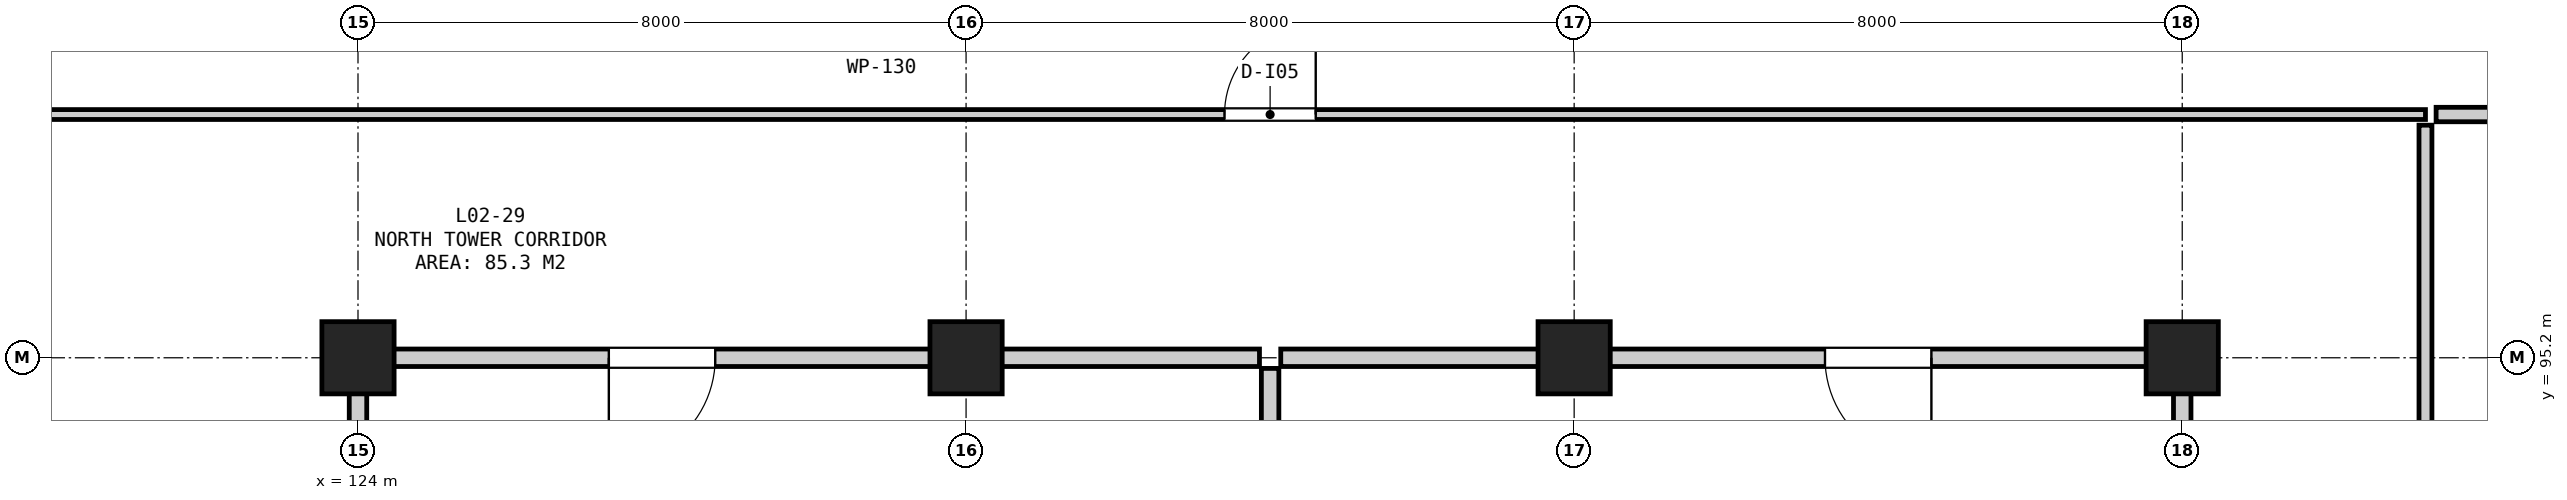
"""IFC4 building model, lengths in metres.
Left out: names, types, materials, properties, quantities, classifications, styles, units other than length and angle.
Written with IfcOpenShell. Run it as: python <this file> out.ifc"""

import sys

from ifc_helpers import new_model, si_unit, direction, frame, frame_2d, origin, origin_2d, place, context, subcontext, project, spatial, rectangle, extrude, element, fill, save


model = new_model("IFC4")
c1 = context("Model", 3, precision=1e-05, world=origin(), true_north=direction((0.0, 1.0)))
c2 = subcontext(c1, "Body", "Model", "MODEL_VIEW")
j1 = project(units=[si_unit("LENGTHUNIT", "METRE"), si_unit("PLANEANGLEUNIT", "RADIAN")], contexts=[c1])
p1 = place(None, origin())
s1 = spatial("IfcSite", under=j1, at=p1, CompositionType="ELEMENT")
p2 = place(p1, origin())
s2 = spatial("IfcBuilding", under=s1, at=p2, CompositionType="ELEMENT")
p3 = place(p2, frame((0.0, 0.0, 10.8)))
s3 = spatial("IfcBuildingStorey", under=s2, at=p3, CompositionType="ELEMENT", Elevation=10.8)
for number, where, z_axis, x_axis in (
    (1, (124.0, 95.2, 0.0), (0.0, 0.0, 1.0), (1.0, 0.0, 0.0)),
    (2, (132.0, 95.2, 0.0), (0.0, 0.0, 1.0), (1.0, 0.0, 0.0)),
    (3, (140.0, 95.2, 0.0), (0.0, 0.0, 1.0), (1.0, 0.0, 0.0)),
    (4, (148.0, 95.2, 0.0), (0.0, 0.0, 1.0), (1.0, 0.0, 0.0)),
):
    element("IfcColumn", number, at=place(p3, frame(where, z_axis=z_axis, x_axis=x_axis)), inside=s3, PredefinedType="COLUMN", context=c2, shape_type="SweptSolid", body=[
        extrude(rectangle(XDim=0.95, YDim=0.95, at=origin_2d()), origin(), (0.0, 0.0, 1.0), 4.8),
    ])
p4 = place(p3, frame((124.14, 95.2, 0.0), z_axis=(0.0, 0.0, 1.0), x_axis=(1.0, 0.0, 0.0)))
e5 = element("IfcWall", 5, at=p4, inside=s3, PredefinedType="SOLIDWALL", context=c2, shape_type="SweptSolid", body=[
    extrude(rectangle(XDim=11.72, YDim=0.23, at=frame_2d((5.86, 0.0))), origin(), (0.0, 0.0, 1.0), 3.645),
])
p5 = place(p4, frame((3.16, 0.0, 0.0)))
e6 = element("IfcOpeningElement", 6, at=p5, cuts=e5, PredefinedType="OPENING", context=c2, shape_type="SweptSolid", body=[
    extrude(rectangle(XDim=1.4, YDim=2.2, at=frame_2d((0.7, 1.1))), frame((0.0, 0.127, 0.0), z_axis=(0.0, -1.0, 0.0), x_axis=(1.0, 0.0, 0.0)), (0.0, 0.0, 1.0), 0.254),
])
p6 = place(p3, frame((124.0, 91.54, 0.0), z_axis=(0.0, 0.0, 1.0), x_axis=(0.0, 1.0, 0.0)))
e7 = element("IfcWall", 7, at=p6, inside=s3, PredefinedType="SOLIDWALL", context=c2, shape_type="SweptSolid", body=[
    extrude(rectangle(XDim=3.52, YDim=0.23, at=frame_2d((1.76, 0.0))), origin(), (0.0, 0.0, 1.0), 3.695),
])
p7 = place(p3, frame((136.0, 91.54, 0.0), z_axis=(0.0, 0.0, 1.0), x_axis=(0.0, 1.0, 0.0)))
e8 = element("IfcWall", 8, at=p7, inside=s3, PredefinedType="SOLIDWALL", context=c2, shape_type="SweptSolid", body=[
    extrude(rectangle(XDim=3.52, YDim=0.23, at=frame_2d((1.76, 0.0))), origin(), (0.0, 0.0, 1.0), 4.5),
])
p8 = place(p3, frame((136.14, 95.2, 0.0), z_axis=(0.0, 0.0, 1.0), x_axis=(1.0, 0.0, 0.0)))
e9 = element("IfcWall", 9, at=p8, inside=s3, PredefinedType="SOLIDWALL", context=c2, shape_type="SweptSolid", body=[
    extrude(rectangle(XDim=11.72, YDim=0.23, at=frame_2d((5.86, 0.0))), origin(), (0.0, 0.0, 1.0), 3.695),
])
p9 = place(p8, frame((7.16, 0.0, 0.0)))
e10 = element("IfcOpeningElement", 10, at=p9, cuts=e9, PredefinedType="OPENING", context=c2, shape_type="SweptSolid", body=[
    extrude(rectangle(XDim=1.4, YDim=2.2, at=frame_2d((0.7, 1.1))), frame((0.0, 0.127, 0.0), z_axis=(0.0, -1.0, 0.0), x_axis=(1.0, 0.0, 0.0)), (0.0, 0.0, 1.0), 0.254),
])
p10 = place(p3, frame((148.0, 91.54, 0.0), z_axis=(0.0, 0.0, 1.0), x_axis=(0.0, 1.0, 0.0)))
e11 = element("IfcWall", 11, at=p10, inside=s3, PredefinedType="SOLIDWALL", context=c2, shape_type="SweptSolid", body=[
    extrude(rectangle(XDim=3.52, YDim=0.23, at=frame_2d((1.76, 0.0))), origin(), (0.0, 0.0, 1.0), 3.795),
])
p11 = place(p3, frame((151.34, 98.4, 0.0), z_axis=(0.0, 0.0, 1.0), x_axis=(1.0, 0.0, 0.0)))
e12 = element("IfcWall", 12, at=p11, inside=s3, PredefinedType="PARTITIONING", context=c2, shape_type="SweptSolid", body=[
    extrude(rectangle(XDim=16.485, YDim=0.19, at=frame_2d((8.242, 0.0))), origin(), (0.0, 0.0, 1.0), 4.5),
])
p12 = place(p3, frame((151.2, 76.14, 0.0), z_axis=(0.0, 0.0, 1.0), x_axis=(0.0, 1.0, 0.0)))
e13 = element("IfcWall", 13, at=p12, inside=s3, PredefinedType="PARTITIONING", context=c2, shape_type="SweptSolid", body=[
    extrude(rectangle(XDim=22.12, YDim=0.17, at=frame_2d((11.06, 0.0))), origin(), (0.0, 0.0, 1.0), 4.5),
])
p13 = place(p12, frame((10.46, 0.0, 0.0)))
e14 = element("IfcOpeningElement", 14, at=p13, cuts=e13, PredefinedType="OPENING", context=c2, shape_type="SweptSolid", body=[
    extrude(rectangle(XDim=1.2, YDim=2.15, at=frame_2d((0.6, 1.075))), frame((0.0, 0.097, 0.0), z_axis=(0.0, -1.0, 0.0), x_axis=(1.0, 0.0, 0.0)), (0.0, 0.0, 1.0), 0.194),
])
p14 = place(p3, frame((110.575, 98.4, 0.0), z_axis=(0.0, 0.0, 1.0), x_axis=(1.0, 0.0, 0.0)))
e15 = element("IfcWall", 15, at=p14, inside=s3, PredefinedType="PARTITIONING", context=c2, shape_type="SweptSolid", body=[
    extrude(rectangle(XDim=40.625, YDim=0.13, at=frame_2d((20.312, 0.0))), origin(), (0.0, 0.0, 1.0), 4.5),
])
p15 = place(p14, frame((24.825, 0.0, 0.0)))
e16 = element("IfcOpeningElement", 16, at=p15, cuts=e15, PredefinedType="OPENING", context=c2, shape_type="SweptSolid", body=[
    extrude(rectangle(XDim=1.2, YDim=2.15, at=frame_2d((0.6, 1.075))), frame((0.0, 0.077, 0.0), z_axis=(0.0, -1.0, 0.0), x_axis=(1.0, 0.0, 0.0)), (0.0, 0.0, 1.0), 0.154),
])
p16 = place(p5, frame((1.4, 0.0, 0.0), z_axis=(0.0, 0.0, 1.0), x_axis=(-1.0, 0.0, 0.0)))
e17 = element("IfcDoor", 17, at=p16, inside=s3, OperationType="SINGLE_SWING_RIGHT", PredefinedType="DOOR", context=c2, shape_type="SweptSolid", body=[
    extrude(rectangle(XDim=1.4, YDim=2.2, at=frame_2d((0.7, 1.1))), frame((0.0, 0.025, 0.0), z_axis=(0.0, -1.0, 0.0), x_axis=(1.0, 0.0, 0.0)), (0.0, 0.0, 1.0), 0.05),
])
fill(e6, e17)
p17 = place(p9, frame((1.4, 0.0, 0.0), z_axis=(0.0, 0.0, 1.0), x_axis=(-1.0, 0.0, 0.0)))
e18 = element("IfcDoor", 18, at=p17, inside=s3, OperationType="SINGLE_SWING_LEFT", PredefinedType="DOOR", context=c2, shape_type="SweptSolid", body=[
    extrude(rectangle(XDim=1.4, YDim=2.2, at=frame_2d((0.7, 1.1))), frame((0.0, 0.025, 0.0), z_axis=(0.0, -1.0, 0.0), x_axis=(1.0, 0.0, 0.0)), (0.0, 0.0, 1.0), 0.05),
])
fill(e10, e18)
p18 = place(p15, origin())
e19 = element("IfcDoor", 19, at=p18, inside=s3, OperationType="SINGLE_SWING_RIGHT", PredefinedType="DOOR", context=c2, shape_type="SweptSolid", body=[
    extrude(rectangle(XDim=1.2, YDim=2.15, at=frame_2d((0.6, 1.075))), frame((0.0, 0.025, 0.0), z_axis=(0.0, -1.0, 0.0), x_axis=(1.0, 0.0, 0.0)), (0.0, 0.0, 1.0), 0.05),
])
fill(e16, e19)
save(model, sys.argv[1])
